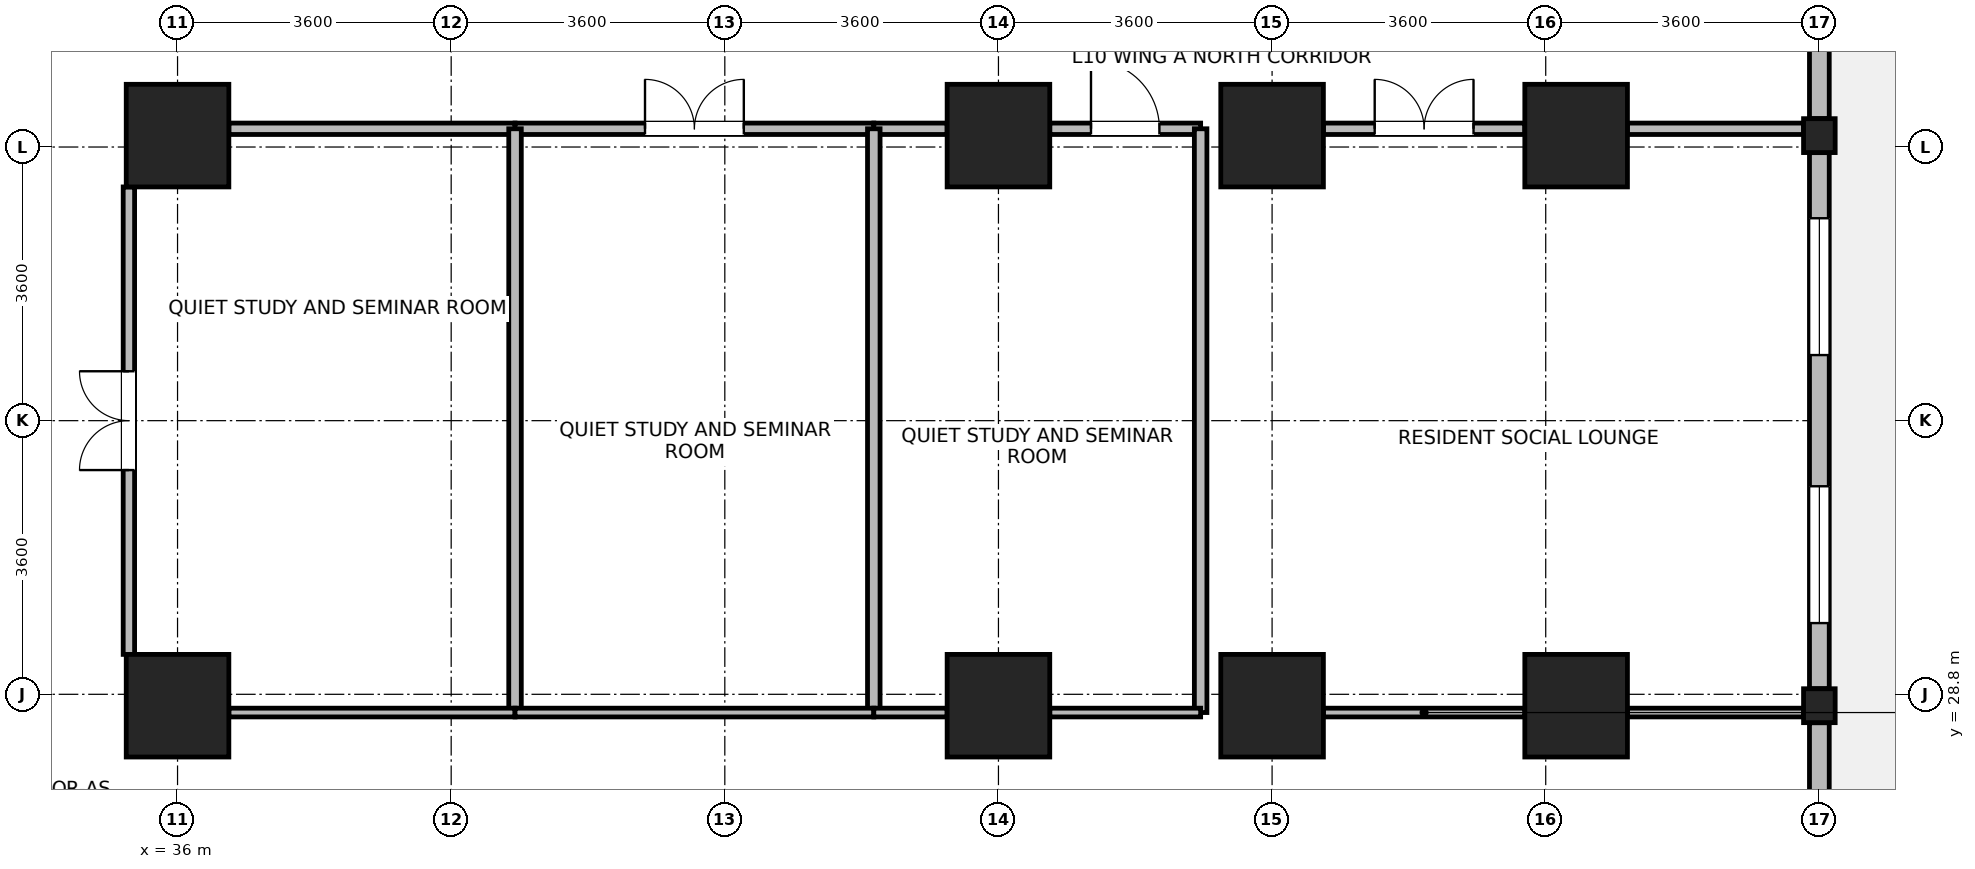
"""IFC4 building model, lengths in metres.
Left out: names, types, materials, properties, quantities, classifications, styles, units other than length and angle.
Written with IfcOpenShell. Run it as: python <this file> out.ifc"""

import sys

from ifc_helpers import new_model, si_unit, direction, frame, frame_2d, origin, origin_2d, place, context, subcontext, project, spatial, rectangle, i_section, extrude, source, transform, mapped, element, fill, save


model = new_model("IFC4")
c1 = context("Model", 3, precision=1e-05, world=origin(), true_north=direction((0.0, 1.0)))
c2 = subcontext(c1, "Body", "Model", "MODEL_VIEW")
j1 = project(units=[si_unit("LENGTHUNIT", "METRE"), si_unit("PLANEANGLEUNIT", "RADIAN")], contexts=[c1])
p1 = place(None, origin())
s1 = spatial("IfcSite", under=j1, at=p1, CompositionType="ELEMENT")
p2 = place(p1, origin())
s2 = spatial("IfcBuilding", under=s1, at=p2, CompositionType="ELEMENT")
p3 = place(p2, frame((0.0, 0.0, 43.8)))
s3 = spatial("IfcBuildingStorey", under=s2, at=p3, CompositionType="ELEMENT", Elevation=43.8)
m1 = source(origin(), c2, "Body", "SweptSolid", [
    extrude(rectangle(XDim=1.35, YDim=1.35, at=origin_2d()), origin(), (0.0, 0.0, 1.0), 3.7),
])
for number, where, z_axis, x_axis in (
    (1, (36.0, 28.65, 0.0), (0.0, 0.0, 1.0), (1.0, 0.0, 0.0)),
    (2, (36.0, 36.15, 0.0), (0.0, 0.0, 1.0), (1.0, 0.0, 0.0)),
    (3, (46.8, 28.65, 0.0), (0.0, 0.0, 1.0), (1.0, 0.0, 0.0)),
    (4, (46.8, 36.15, 0.0), (0.0, 0.0, 1.0), (1.0, 0.0, 0.0)),
    (5, (50.4, 28.65, 0.0), (0.0, 0.0, 1.0), (1.0, 0.0, 0.0)),
    (6, (50.4, 36.15, 0.0), (0.0, 0.0, 1.0), (1.0, 0.0, 0.0)),
    (7, (54.4, 28.65, 0.0), (0.0, 0.0, 1.0), (1.0, 0.0, 0.0)),
    (8, (54.4, 36.15, 0.0), (0.0, 0.0, 1.0), (1.0, 0.0, 0.0)),
):
    element("IfcColumn", number, at=place(p3, frame(where, z_axis=z_axis, x_axis=x_axis)), inside=s3, PredefinedType="COLUMN", context=c2, shape_type="MappedRepresentation", body=[
        mapped(m1, transform((0.0, 0.0, 0.0), x_axis=(1.0, 0.0, 0.0), y_axis=(0.0, 1.0, 0.0), z_axis=(0.0, 0.0, 1.0), scale=1.0)),
    ])
m2 = source(origin(), c2, "Body", "SweptSolid", [
    extrude(i_section(OverallWidth=0.416, OverallDepth=0.446, WebThickness=0.029, FlangeThickness=0.04, FilletRadius=0.015, at=origin_2d()), origin(), (0.0, 0.0, 1.0), 3.7),
])
for number, where, z_axis, x_axis in (
    (9, (57.6, 28.65, 0.0), (0.0, 0.0, 1.0), (1.0, 0.0, 0.0)),
    (10, (57.6, 36.15, 0.0), (0.0, 0.0, 1.0), (1.0, 0.0, 0.0)),
):
    element("IfcColumn", number, at=place(p3, frame(where, z_axis=z_axis, x_axis=x_axis)), inside=s3, PredefinedType="COLUMN", context=c2, shape_type="MappedRepresentation", body=[
        mapped(m2, transform((0.0, 0.0, 0.0), x_axis=(1.0, 0.0, 0.0), y_axis=(0.0, 1.0, 0.0), z_axis=(0.0, 0.0, 1.0), scale=1.0)),
    ])
p4 = place(p3, frame((57.6, 28.426, 0.0), z_axis=(0.0, 0.0, 1.0), x_axis=(0.0, -1.0, 0.0)))
e11 = element("IfcWall", 11, at=p4, inside=s3, PredefinedType="STANDARD", context=c2, shape_type="SweptSolid", body=[
    extrude(rectangle(XDim=6.602, YDim=0.26, at=frame_2d((3.301, 0.0))), origin(), (0.0, 0.0, 1.0), 2.93),
])
p5 = place(p4, frame((4.052, 0.0, 0.85)))
e12 = element("IfcOpeningElement", 12, at=p5, cuts=e11, PredefinedType="OPENING", context=c2, shape_type="SweptSolid", body=[
    extrude(rectangle(XDim=1.8, YDim=1.85, at=frame_2d((0.9, 0.925))), frame((0.0, 0.14, 0.0), z_axis=(0.0, -1.0, 0.0), x_axis=(1.0, 0.0, 0.0)), (0.0, 0.0, 1.0), 0.28),
])
p6 = place(p4, frame((2.298, 0.0, 0.85)))
e13 = element("IfcOpeningElement", 13, at=p6, cuts=e11, PredefinedType="OPENING", context=c2, shape_type="SweptSolid", body=[
    extrude(rectangle(XDim=0.95, YDim=1.75, at=frame_2d((0.475, 0.875))), frame((0.0, 0.14, 0.0), z_axis=(0.0, -1.0, 0.0), x_axis=(1.0, 0.0, 0.0)), (0.0, 0.0, 1.0), 0.28),
])
p7 = place(p3, frame((57.6, 35.926, 0.0), z_axis=(0.0, 0.0, 1.0), x_axis=(0.0, -1.0, 0.0)))
e14 = element("IfcWall", 14, at=p7, inside=s3, PredefinedType="STANDARD", context=c2, shape_type="SweptSolid", body=[
    extrude(rectangle(XDim=7.052, YDim=0.26, at=frame_2d((3.526, 0.0))), origin(), (0.0, 0.0, 1.0), 2.93),
])
p8 = place(p7, frame((0.863, 0.0, 0.85)))
e15 = element("IfcOpeningElement", 15, at=p8, cuts=e14, PredefinedType="OPENING", context=c2, shape_type="SweptSolid", body=[
    extrude(rectangle(XDim=1.8, YDim=1.85, at=frame_2d((0.9, 0.925))), frame((0.0, 0.14, 0.0), z_axis=(0.0, -1.0, 0.0), x_axis=(1.0, 0.0, 0.0)), (0.0, 0.0, 1.0), 0.28),
])
p9 = place(p7, frame((4.389, 0.0, 0.85)))
e16 = element("IfcOpeningElement", 16, at=p9, cuts=e14, PredefinedType="OPENING", context=c2, shape_type="SweptSolid", body=[
    extrude(rectangle(XDim=1.8, YDim=1.85, at=frame_2d((0.9, 0.925))), frame((0.0, 0.14, 0.0), z_axis=(0.0, -1.0, 0.0), x_axis=(1.0, 0.0, 0.0)), (0.0, 0.0, 1.0), 0.28),
])
p10 = place(p3, frame((57.6, 43.33, 0.0), z_axis=(0.0, 0.0, 1.0), x_axis=(0.0, -1.0, 0.0)))
e17 = element("IfcWall", 17, at=p10, inside=s3, PredefinedType="STANDARD", context=c2, shape_type="SweptSolid", body=[
    extrude(rectangle(XDim=6.956, YDim=0.26, at=frame_2d((3.478, 0.0))), origin(), (0.0, 0.0, 1.0), 3.43),
])
p11 = place(p10, frame((0.839, 0.0, 0.85)))
e18 = element("IfcOpeningElement", 18, at=p11, cuts=e17, PredefinedType="OPENING", context=c2, shape_type="SweptSolid", body=[
    extrude(rectangle(XDim=1.8, YDim=1.85, at=frame_2d((0.9, 0.925))), frame((0.0, 0.14, 0.0), z_axis=(0.0, -1.0, 0.0), x_axis=(1.0, 0.0, 0.0)), (0.0, 0.0, 1.0), 0.28),
])
p12 = place(p10, frame((3.003, 0.0, 0.85)))
e19 = element("IfcOpeningElement", 19, at=p12, cuts=e17, PredefinedType="OPENING", context=c2, shape_type="SweptSolid", body=[
    extrude(rectangle(XDim=0.95, YDim=1.75, at=frame_2d((0.475, 0.875))), frame((0.0, 0.14, 0.0), z_axis=(0.0, -1.0, 0.0), x_axis=(1.0, 0.0, 0.0)), (0.0, 0.0, 1.0), 0.28),
])
p13 = place(p3, frame((51.075, 36.24, 0.0), z_axis=(0.0, 0.0, 1.0), x_axis=(1.0, 0.0, 0.0)))
e20 = element("IfcWall", 20, at=p13, inside=s3, PredefinedType="PARTITIONING", context=c2, shape_type="SweptSolid", body=[
    extrude(rectangle(XDim=2.65, YDim=0.15, at=frame_2d((1.325, 0.0))), origin(), (0.0, 0.0, 1.0), 2.78),
])
p14 = place(p13, frame((0.675, 0.0, 0.0)))
e21 = element("IfcOpeningElement", 21, at=p14, cuts=e20, PredefinedType="OPENING", context=c2, shape_type="SweptSolid", body=[
    extrude(rectangle(XDim=1.3, YDim=2.12, at=frame_2d((0.65, 1.06))), frame((0.0, 0.085, 0.0), z_axis=(0.0, -1.0, 0.0), x_axis=(1.0, 0.0, 0.0)), (0.0, 0.0, 1.0), 0.17),
])
p15 = place(p3, frame((55.075, 36.24, 0.0), z_axis=(0.0, 0.0, 1.0), x_axis=(1.0, 0.0, 0.0)))
e22 = element("IfcWall", 22, at=p15, inside=s3, PredefinedType="PARTITIONING", context=c2, shape_type="SweptSolid", body=[
    extrude(rectangle(XDim=2.317, YDim=0.15, at=frame_2d((1.159, 0.0))), origin(), (0.0, 0.0, 1.0), 2.78),
])
p16 = place(p3, frame((35.36, 29.325, 0.0), z_axis=(0.0, 0.0, 1.0), x_axis=(0.0, 1.0, 0.0)))
e23 = element("IfcWall", 23, at=p16, inside=s3, PredefinedType="PARTITIONING", context=c2, shape_type="SweptSolid", body=[
    extrude(rectangle(XDim=6.15, YDim=0.15, at=frame_2d((3.075, 0.0))), origin(), (0.0, 0.0, 1.0), 3.43),
])
p17 = place(p16, frame((2.425, 0.0, 0.0)))
e24 = element("IfcOpeningElement", 24, at=p17, cuts=e23, PredefinedType="OPENING", context=c2, shape_type="SweptSolid", body=[
    extrude(rectangle(XDim=1.3, YDim=2.12, at=frame_2d((0.65, 1.06))), frame((0.0, 0.085, 0.0), z_axis=(0.0, -1.0, 0.0), x_axis=(1.0, 0.0, 0.0)), (0.0, 0.0, 1.0), 0.17),
])
p18 = place(p3, frame((36.675, 36.24, 0.0), z_axis=(0.0, 0.0, 1.0), x_axis=(1.0, 0.0, 0.0)))
e25 = element("IfcWall", 25, at=p18, inside=s3, PredefinedType="PARTITIONING", context=c2, shape_type="SweptSolid", body=[
    extrude(rectangle(XDim=3.765, YDim=0.15, at=frame_2d((1.882, 0.0))), origin(), (0.0, 0.0, 1.0), 2.78),
])
p19 = place(p3, frame((40.44, 36.24, 0.0), z_axis=(0.0, 0.0, 1.0), x_axis=(1.0, 0.0, 0.0)))
e26 = element("IfcWall", 26, at=p19, inside=s3, PredefinedType="PARTITIONING", context=c2, shape_type="SweptSolid", body=[
    extrude(rectangle(XDim=4.72, YDim=0.15, at=frame_2d((2.36, 0.0))), origin(), (0.0, 0.0, 1.0), 2.78),
])
p20 = place(p19, frame((1.71, 0.0, 0.0)))
e27 = element("IfcOpeningElement", 27, at=p20, cuts=e26, PredefinedType="OPENING", context=c2, shape_type="SweptSolid", body=[
    extrude(rectangle(XDim=1.3, YDim=2.12, at=frame_2d((0.65, 1.06))), frame((0.0, 0.085, 0.0), z_axis=(0.0, -1.0, 0.0), x_axis=(1.0, 0.0, 0.0)), (0.0, 0.0, 1.0), 0.17),
])
p21 = place(p3, frame((45.16, 36.24, 0.0), z_axis=(0.0, 0.0, 1.0), x_axis=(1.0, 0.0, 0.0)))
e28 = element("IfcWall", 28, at=p21, inside=s3, PredefinedType="PARTITIONING", context=c2, shape_type="SweptSolid", body=[
    extrude(rectangle(XDim=0.965, YDim=0.15, at=frame_2d((0.482, 0.0))), origin(), (0.0, 0.0, 1.0), 2.78),
])
p22 = place(p3, frame((47.475, 36.24, 0.0), z_axis=(0.0, 0.0, 1.0), x_axis=(1.0, 0.0, 0.0)))
e29 = element("IfcWall", 29, at=p22, inside=s3, PredefinedType="PARTITIONING", context=c2, shape_type="SweptSolid", body=[
    extrude(rectangle(XDim=1.985, YDim=0.15, at=frame_2d((0.992, 0.0))), origin(), (0.0, 0.0, 1.0), 2.78),
])
p23 = place(p22, frame((0.542, 0.0, 0.0)))
e30 = element("IfcOpeningElement", 30, at=p23, cuts=e29, PredefinedType="OPENING", context=c2, shape_type="SweptSolid", body=[
    extrude(rectangle(XDim=0.9, YDim=2.08, at=frame_2d((0.45, 1.04))), frame((0.0, 0.085, 0.0), z_axis=(0.0, -1.0, 0.0), x_axis=(1.0, 0.0, 0.0)), (0.0, 0.0, 1.0), 0.17),
])
p24 = place(p3, frame((51.075, 28.56, 0.0), z_axis=(0.0, 0.0, 1.0), x_axis=(1.0, 0.0, 0.0)))
e31 = element("IfcWall", 31, at=p24, inside=s3, PredefinedType="PARTITIONING", context=c2, shape_type="SweptSolid", body=[
    extrude(rectangle(XDim=2.65, YDim=0.115, at=frame_2d((1.325, 0.0))), origin(), (0.0, 0.0, 1.0), 2.78),
])
p25 = place(p3, frame((55.075, 28.56, 0.0), z_axis=(0.0, 0.0, 1.0), x_axis=(1.0, 0.0, 0.0)))
e32 = element("IfcWall", 32, at=p25, inside=s3, PredefinedType="PARTITIONING", context=c2, shape_type="SweptSolid", body=[
    extrude(rectangle(XDim=2.317, YDim=0.115, at=frame_2d((1.159, 0.0))), origin(), (0.0, 0.0, 1.0), 2.78),
])
for number, where, z_axis, x_axis in (
    (33, (40.44, 28.56, 0.0), (0.0, 0.0, 1.0), (0.0, 1.0, 0.0)),
    (34, (45.16, 28.56, 0.0), (0.0, 0.0, 1.0), (0.0, 1.0, 0.0)),
    (35, (49.46, 28.56, 0.0), (0.0, 0.0, 1.0), (0.0, 1.0, 0.0)),
):
    element("IfcWall", number, at=place(p3, frame(where, z_axis=z_axis, x_axis=x_axis)), inside=s3, PredefinedType="PARTITIONING", context=c2, shape_type="SweptSolid", body=[
        extrude(rectangle(XDim=7.68, YDim=0.165, at=frame_2d((3.84, 0.0))), origin(), (0.0, 0.0, 1.0), 3.43),
    ])
p26 = place(p3, frame((36.675, 28.56, 0.0), z_axis=(0.0, 0.0, 1.0), x_axis=(1.0, 0.0, 0.0)))
e36 = element("IfcWall", 36, at=p26, inside=s3, PredefinedType="PARTITIONING", context=c2, shape_type="SweptSolid", body=[
    extrude(rectangle(XDim=3.765, YDim=0.115, at=frame_2d((1.882, 0.0))), origin(), (0.0, 0.0, 1.0), 2.78),
])
p27 = place(p3, frame((40.44, 28.56, 0.0), z_axis=(0.0, 0.0, 1.0), x_axis=(1.0, 0.0, 0.0)))
e37 = element("IfcWall", 37, at=p27, inside=s3, PredefinedType="PARTITIONING", context=c2, shape_type="SweptSolid", body=[
    extrude(rectangle(XDim=4.72, YDim=0.115, at=frame_2d((2.36, 0.0))), origin(), (0.0, 0.0, 1.0), 2.78),
])
p28 = place(p3, frame((45.16, 28.56, 0.0), z_axis=(0.0, 0.0, 1.0), x_axis=(1.0, 0.0, 0.0)))
e38 = element("IfcWall", 38, at=p28, inside=s3, PredefinedType="PARTITIONING", context=c2, shape_type="SweptSolid", body=[
    extrude(rectangle(XDim=0.965, YDim=0.115, at=frame_2d((0.482, 0.0))), origin(), (0.0, 0.0, 1.0), 2.78),
])
p29 = place(p3, frame((47.475, 28.56, 0.0), z_axis=(0.0, 0.0, 1.0), x_axis=(1.0, 0.0, 0.0)))
e39 = element("IfcWall", 39, at=p29, inside=s3, PredefinedType="PARTITIONING", context=c2, shape_type="SweptSolid", body=[
    extrude(rectangle(XDim=1.985, YDim=0.115, at=frame_2d((0.992, 0.0))), origin(), (0.0, 0.0, 1.0), 2.78),
])
p30 = place(p8, origin())
e40 = element("IfcWindow", 40, at=p30, inside=s3, PartitioningType="SINGLE_PANEL", PredefinedType="WINDOW", context=c2, shape_type="SweptSolid", body=[
    extrude(rectangle(XDim=1.8, YDim=1.85, at=frame_2d((0.9, 0.925))), frame((0.0, 0.03, 0.0), z_axis=(0.0, -1.0, 0.0), x_axis=(1.0, 0.0, 0.0)), (0.0, 0.0, 1.0), 0.06),
])
fill(e15, e40)
p31 = place(p9, origin())
e41 = element("IfcWindow", 41, at=p31, inside=s3, PartitioningType="SINGLE_PANEL", PredefinedType="WINDOW", context=c2, shape_type="SweptSolid", body=[
    extrude(rectangle(XDim=1.8, YDim=1.85, at=frame_2d((0.9, 0.925))), frame((0.0, 0.03, 0.0), z_axis=(0.0, -1.0, 0.0), x_axis=(1.0, 0.0, 0.0)), (0.0, 0.0, 1.0), 0.06),
])
fill(e16, e41)
p32 = place(p14, origin())
e42 = element("IfcDoor", 42, at=p32, inside=s3, OperationType="DOUBLE_DOOR_SINGLE_SWING", PredefinedType="DOOR", context=c2, shape_type="SweptSolid", body=[
    extrude(rectangle(XDim=1.3, YDim=2.12, at=frame_2d((0.65, 1.06))), frame((0.0, 0.025, 0.0), z_axis=(0.0, -1.0, 0.0), x_axis=(1.0, 0.0, 0.0)), (0.0, 0.0, 1.0), 0.05),
])
fill(e21, e42)
p33 = place(p17, origin())
e43 = element("IfcDoor", 43, at=p33, inside=s3, OperationType="DOUBLE_DOOR_SINGLE_SWING", PredefinedType="DOOR", context=c2, shape_type="SweptSolid", body=[
    extrude(rectangle(XDim=1.3, YDim=2.12, at=frame_2d((0.65, 1.06))), frame((0.0, 0.025, 0.0), z_axis=(0.0, -1.0, 0.0), x_axis=(1.0, 0.0, 0.0)), (0.0, 0.0, 1.0), 0.05),
])
fill(e24, e43)
p34 = place(p20, origin())
e44 = element("IfcDoor", 44, at=p34, inside=s3, OperationType="DOUBLE_DOOR_SINGLE_SWING", PredefinedType="DOOR", context=c2, shape_type="SweptSolid", body=[
    extrude(rectangle(XDim=1.3, YDim=2.12, at=frame_2d((0.65, 1.06))), frame((0.0, 0.025, 0.0), z_axis=(0.0, -1.0, 0.0), x_axis=(1.0, 0.0, 0.0)), (0.0, 0.0, 1.0), 0.05),
])
fill(e27, e44)
p35 = place(p23, origin())
e45 = element("IfcDoor", 45, at=p35, inside=s3, OperationType="SINGLE_SWING_LEFT", PredefinedType="DOOR", context=c2, shape_type="SweptSolid", body=[
    extrude(rectangle(XDim=0.9, YDim=2.08, at=frame_2d((0.45, 1.04))), frame((0.0, 0.025, 0.0), z_axis=(0.0, -1.0, 0.0), x_axis=(1.0, 0.0, 0.0)), (0.0, 0.0, 1.0), 0.05),
])
fill(e30, e45)
save(model, sys.argv[1])
